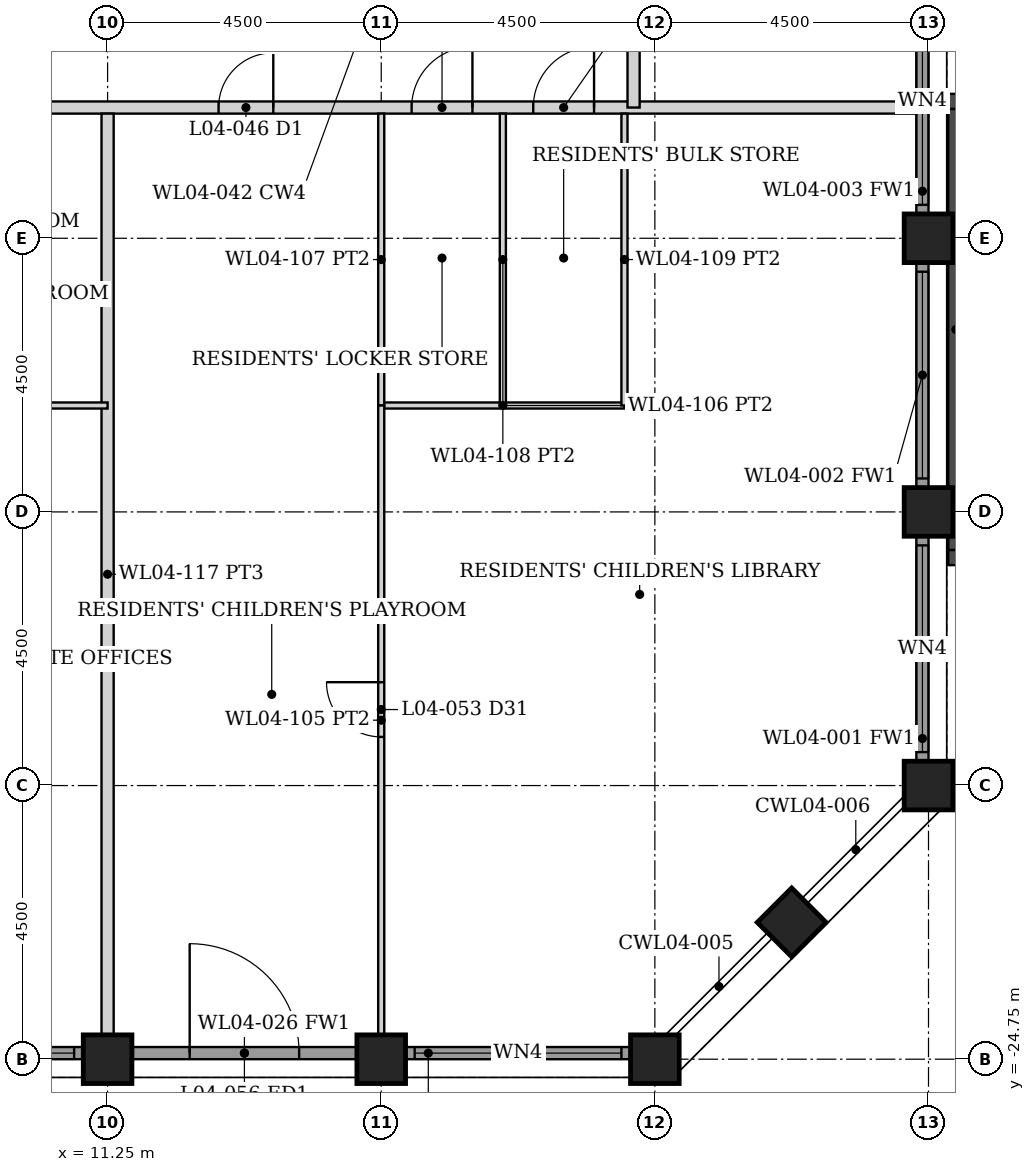
"""IFC4 building model, lengths in metres.
Left out: names, types, materials, properties, quantities, classifications, styles, units other than length and angle.
Written with IfcOpenShell. Run it as: python <this file> out.ifc"""

import sys

from ifc_helpers import new_model, si_unit, direction, frame, frame_2d, origin, origin_2d, place, context, subcontext, project, spatial, rectangle, hollow_rectangle, extrude, element, fill, save


model = new_model("IFC4")
c1 = context("Model", 3, precision=1e-05, world=origin(), true_north=direction((0.0, 1.0)))
c2 = subcontext(c1, "Body", "Model", "MODEL_VIEW")
j1 = project(units=[si_unit("LENGTHUNIT", "METRE"), si_unit("PLANEANGLEUNIT", "RADIAN")], contexts=[c1])
p1 = place(None, origin())
s1 = spatial("IfcSite", under=j1, at=p1, CompositionType="ELEMENT")
p2 = place(p1, origin())
s2 = spatial("IfcBuilding", under=s1, at=p2, CompositionType="ELEMENT")
p3 = place(p2, frame((0.0, 0.0, 21.5)))
s3 = spatial("IfcBuildingStorey", under=s2, at=p3, CompositionType="ELEMENT", Elevation=21.5)
for number, where, z_axis, x_axis in (
    (1, (24.75, -20.25, 0.0), (0.0, 0.0, 1.0), (1.0, 0.0, 0.0)),
    (2, (24.75, -15.75, 0.0), (0.0, 0.0, 1.0), (1.0, 0.0, 0.0)),
    (3, (24.75, -11.25, 0.0), (0.0, 0.0, 1.0), (1.0, 0.0, 0.0)),
    (4, (11.25, -24.75, 0.0), (0.0, 0.0, 1.0), (0.0, 1.0, 0.0)),
    (5, (15.75, -24.75, 0.0), (0.0, 0.0, 1.0), (0.0, 1.0, 0.0)),
    (6, (20.25, -24.75, 0.0), (0.0, 0.0, 1.0), (0.0, 1.0, 0.0)),
    (7, (22.5, -22.5, 0.0), (0.0, 0.0, 1.0), (0.707, -0.707, 0.0)),
):
    element("IfcColumn", number, at=place(p3, frame(where, z_axis=z_axis, x_axis=x_axis)), inside=s3, PredefinedType="COLUMN", context=c2, shape_type="SweptSolid", body=[
        extrude(hollow_rectangle(XDim=0.8, YDim=0.8, WallThickness=0.08, at=origin_2d()), origin(), (0.0, 0.0, 1.0), 5.0),
    ])
p4 = place(p3, frame((25.075, -16.5, 0.0), z_axis=(0.0, 0.0, 1.0), x_axis=(1.0, 0.0, 0.0)))
e8 = element("IfcWall", 8, at=p4, inside=s3, PredefinedType="SHEAR", context=c2, shape_type="SweptSolid", body=[
    extrude(rectangle(XDim=3.55, YDim=0.25, at=frame_2d((1.775, 0.0))), origin(), (0.0, 0.0, 1.0), 5.0),
])
p5 = place(p3, frame((25.075, -9.0, 0.0), z_axis=(0.0, 0.0, 1.0), x_axis=(1.0, 0.0, 0.0)))
e9 = element("IfcWall", 9, at=p5, inside=s3, PredefinedType="SHEAR", context=c2, shape_type="SweptSolid", body=[
    extrude(rectangle(XDim=3.55, YDim=0.25, at=frame_2d((1.775, 0.0))), origin(), (0.0, 0.0, 1.0), 5.0),
])
p6 = place(p5, frame((0.475, 0.0, 0.0)))
e10 = element("IfcOpeningElement", 10, at=p6, cuts=e9, PredefinedType="OPENING", context=c2, shape_type="SweptSolid", body=[
    extrude(rectangle(XDim=1.2, YDim=2.2, at=frame_2d((0.6, 1.1))), frame((0.0, 0.135, 0.0), z_axis=(0.0, -1.0, 0.0), x_axis=(1.0, 0.0, 0.0)), (0.0, 0.0, 1.0), 0.27),
])
p7 = place(p3, frame((25.2, -16.375, 0.0), z_axis=(0.0, 0.0, 1.0), x_axis=(0.0, 1.0, 0.0)))
e11 = element("IfcWall", 11, at=p7, inside=s3, PredefinedType="SHEAR", context=c2, shape_type="SweptSolid", body=[
    extrude(rectangle(XDim=7.25, YDim=0.25, at=frame_2d((3.625, 0.0))), origin(), (0.0, 0.0, 1.0), 5.0),
])
p8 = place(p3, frame((7.155, -24.65, 0.0), z_axis=(0.0, 0.0, 1.0), x_axis=(1.0, 0.0, 0.0)))
e12 = element("IfcWall", 12, at=p8, inside=s3, PredefinedType="SOLIDWALL", context=c2, shape_type="SweptSolid", body=[
    extrude(rectangle(XDim=3.69, YDim=0.2, at=frame_2d((1.845, 0.0))), origin(), (0.0, 0.0, 1.0), 3.879),
])
p9 = place(p8, frame((0.145, 0.0, 0.3)))
e13 = element("IfcOpeningElement", 13, at=p9, cuts=e12, PredefinedType="OPENING", context=c2, shape_type="SweptSolid", body=[
    extrude(rectangle(XDim=3.4, YDim=3.429, at=frame_2d((1.7, 1.714))), frame((0.0, 0.11, 0.0), z_axis=(0.0, -1.0, 0.0), x_axis=(1.0, 0.0, 0.0)), (0.0, 0.0, 1.0), 0.22),
])
p10 = place(p3, frame((11.655, -24.65, 0.0), z_axis=(0.0, 0.0, 1.0), x_axis=(1.0, 0.0, 0.0)))
e14 = element("IfcWall", 14, at=p10, inside=s3, PredefinedType="SOLIDWALL", context=c2, shape_type="SweptSolid", body=[
    extrude(rectangle(XDim=3.69, YDim=0.2, at=frame_2d((1.845, 0.0))), origin(), (0.0, 0.0, 1.0), 3.879),
])
p11 = place(p10, frame((0.945, 0.0, 0.0)))
e15 = element("IfcOpeningElement", 15, at=p11, cuts=e14, PredefinedType="OPENING", context=c2, shape_type="SweptSolid", body=[
    extrude(rectangle(XDim=1.8, YDim=2.4, at=frame_2d((0.9, 1.2))), frame((0.0, 0.11, 0.0), z_axis=(0.0, -1.0, 0.0), x_axis=(1.0, 0.0, 0.0)), (0.0, 0.0, 1.0), 0.22),
])
p12 = place(p3, frame((16.155, -24.65, 0.0), z_axis=(0.0, 0.0, 1.0), x_axis=(1.0, 0.0, 0.0)))
e16 = element("IfcWall", 16, at=p12, inside=s3, PredefinedType="SOLIDWALL", context=c2, shape_type="SweptSolid", body=[
    extrude(rectangle(XDim=3.69, YDim=0.2, at=frame_2d((1.845, 0.0))), origin(), (0.0, 0.0, 1.0), 3.879),
])
p13 = place(p12, frame((0.145, 0.0, 0.3)))
e17 = element("IfcOpeningElement", 17, at=p13, cuts=e16, PredefinedType="OPENING", context=c2, shape_type="SweptSolid", body=[
    extrude(rectangle(XDim=3.4, YDim=3.429, at=frame_2d((1.7, 1.714))), frame((0.0, 0.11, 0.0), z_axis=(0.0, -1.0, 0.0), x_axis=(1.0, 0.0, 0.0)), (0.0, 0.0, 1.0), 0.22),
])
p14 = place(p3, frame((24.65, -19.845, 0.0), z_axis=(0.0, 0.0, 1.0), x_axis=(0.0, 1.0, 0.0)))
e18 = element("IfcWall", 18, at=p14, inside=s3, PredefinedType="SOLIDWALL", context=c2, shape_type="SweptSolid", body=[
    extrude(rectangle(XDim=3.69, YDim=0.2, at=frame_2d((1.845, 0.0))), origin(), (0.0, 0.0, 1.0), 3.879),
])
p15 = place(p14, frame((0.145, 0.0, 0.3)))
e19 = element("IfcOpeningElement", 19, at=p15, cuts=e18, PredefinedType="OPENING", context=c2, shape_type="SweptSolid", body=[
    extrude(rectangle(XDim=3.4, YDim=3.429, at=frame_2d((1.7, 1.714))), frame((0.0, 0.11, 0.0), z_axis=(0.0, -1.0, 0.0), x_axis=(1.0, 0.0, 0.0)), (0.0, 0.0, 1.0), 0.22),
])
p16 = place(p3, frame((24.65, -15.345, 0.0), z_axis=(0.0, 0.0, 1.0), x_axis=(0.0, 1.0, 0.0)))
e20 = element("IfcWall", 20, at=p16, inside=s3, PredefinedType="SOLIDWALL", context=c2, shape_type="SweptSolid", body=[
    extrude(rectangle(XDim=3.69, YDim=0.2, at=frame_2d((1.845, 0.0))), origin(), (0.0, 0.0, 1.0), 3.879),
])
p17 = place(p16, frame((0.145, 0.0, 0.3)))
e21 = element("IfcOpeningElement", 21, at=p17, cuts=e20, PredefinedType="OPENING", context=c2, shape_type="SweptSolid", body=[
    extrude(rectangle(XDim=3.4, YDim=3.429, at=frame_2d((1.7, 1.714))), frame((0.0, 0.11, 0.0), z_axis=(0.0, -1.0, 0.0), x_axis=(1.0, 0.0, 0.0)), (0.0, 0.0, 1.0), 0.22),
])
p18 = place(p3, frame((24.65, -10.845, 0.0), z_axis=(0.0, 0.0, 1.0), x_axis=(0.0, 1.0, 0.0)))
e22 = element("IfcWall", 22, at=p18, inside=s3, PredefinedType="SOLIDWALL", context=c2, shape_type="SweptSolid", body=[
    extrude(rectangle(XDim=3.69, YDim=0.2, at=frame_2d((1.845, 0.0))), origin(), (0.0, 0.0, 1.0), 3.879),
])
p19 = place(p18, frame((0.145, 0.0, 0.3)))
e23 = element("IfcOpeningElement", 23, at=p19, cuts=e22, PredefinedType="OPENING", context=c2, shape_type="SweptSolid", body=[
    extrude(rectangle(XDim=3.4, YDim=3.429, at=frame_2d((1.7, 1.714))), frame((0.0, 0.11, 0.0), z_axis=(0.0, -1.0, 0.0), x_axis=(1.0, 0.0, 0.0)), (0.0, 0.0, 1.0), 0.22),
])
p20 = place(p3, frame((-24.55, -9.1, 0.0), z_axis=(0.0, 0.0, 1.0), x_axis=(1.0, 0.0, 0.0)))
e24 = element("IfcWall", 24, at=p20, inside=s3, PredefinedType="PARTITIONING", context=c2, shape_type="SweptSolid", body=[
    extrude(rectangle(XDim=49.1, YDim=0.2, at=frame_2d((24.55, 0.0))), origin(), (0.0, 0.0, 1.0), 3.873),
])
p21 = place(p20, frame((6.452, 0.0, 0.0)))
e25 = element("IfcOpeningElement", 25, at=p21, cuts=e24, PredefinedType="OPENING", context=c2, shape_type="SweptSolid", body=[
    extrude(rectangle(XDim=0.9, YDim=2.1, at=frame_2d((0.45, 1.05))), frame((0.0, 0.11, 0.0), z_axis=(0.0, -1.0, 0.0), x_axis=(1.0, 0.0, 0.0)), (0.0, 0.0, 1.0), 0.22),
])
p22 = place(p20, frame((12.85, 0.0, 0.0)))
e26 = element("IfcOpeningElement", 26, at=p22, cuts=e24, PredefinedType="OPENING", context=c2, shape_type="SweptSolid", body=[
    extrude(rectangle(XDim=0.9, YDim=2.1, at=frame_2d((0.45, 1.05))), frame((0.0, 0.11, 0.0), z_axis=(0.0, -1.0, 0.0), x_axis=(1.0, 0.0, 0.0)), (0.0, 0.0, 1.0), 0.22),
])
p23 = place(p20, frame((20.934, 0.0, 0.0)))
e27 = element("IfcOpeningElement", 27, at=p23, cuts=e24, PredefinedType="OPENING", context=c2, shape_type="SweptSolid", body=[
    extrude(rectangle(XDim=0.9, YDim=2.1, at=frame_2d((0.45, 1.05))), frame((0.0, 0.11, 0.0), z_axis=(0.0, -1.0, 0.0), x_axis=(1.0, 0.0, 0.0)), (0.0, 0.0, 1.0), 0.22),
])
p24 = place(p20, frame((18.425, 0.0, 0.0)))
e28 = element("IfcOpeningElement", 28, at=p24, cuts=e24, PredefinedType="OPENING", context=c2, shape_type="SweptSolid", body=[
    extrude(rectangle(XDim=1.5, YDim=2.1, at=frame_2d((0.75, 1.05))), frame((0.0, 0.11, 0.0), z_axis=(0.0, -1.0, 0.0), x_axis=(1.0, 0.0, 0.0)), (0.0, 0.0, 1.0), 0.22),
])
p25 = place(p20, frame((30.18, 0.0, 0.0)))
e29 = element("IfcOpeningElement", 29, at=p25, cuts=e24, PredefinedType="OPENING", context=c2, shape_type="SweptSolid", body=[
    extrude(rectangle(XDim=0.9, YDim=2.1, at=frame_2d((0.45, 1.05))), frame((0.0, 0.11, 0.0), z_axis=(0.0, -1.0, 0.0), x_axis=(1.0, 0.0, 0.0)), (0.0, 0.0, 1.0), 0.22),
])
p26 = place(p20, frame((23.3, 0.0, 0.0)))
e30 = element("IfcOpeningElement", 30, at=p26, cuts=e24, PredefinedType="OPENING", context=c2, shape_type="SweptSolid", body=[
    extrude(rectangle(XDim=1.0, YDim=2.1, at=frame_2d((0.5, 1.05))), frame((0.0, 0.11, 0.0), z_axis=(0.0, -1.0, 0.0), x_axis=(1.0, 0.0, 0.0)), (0.0, 0.0, 1.0), 0.22),
])
p27 = place(p20, frame((26.15, 0.0, 0.0)))
e31 = element("IfcOpeningElement", 31, at=p27, cuts=e24, PredefinedType="OPENING", context=c2, shape_type="SweptSolid", body=[
    extrude(rectangle(XDim=0.8, YDim=2.1, at=frame_2d((0.4, 1.05))), frame((0.0, 0.11, 0.0), z_axis=(0.0, -1.0, 0.0), x_axis=(1.0, 0.0, 0.0)), (0.0, 0.0, 1.0), 0.22),
])
p28 = place(p20, frame((28.4, 0.0, 0.0)))
e32 = element("IfcOpeningElement", 32, at=p28, cuts=e24, PredefinedType="OPENING", context=c2, shape_type="SweptSolid", body=[
    extrude(rectangle(XDim=1.0, YDim=2.1, at=frame_2d((0.5, 1.05))), frame((0.0, 0.11, 0.0), z_axis=(0.0, -1.0, 0.0), x_axis=(1.0, 0.0, 0.0)), (0.0, 0.0, 1.0), 0.22),
])
p29 = place(p20, frame((33.05, 0.0, 0.0)))
e33 = element("IfcOpeningElement", 33, at=p29, cuts=e24, PredefinedType="OPENING", context=c2, shape_type="SweptSolid", body=[
    extrude(rectangle(XDim=1.0, YDim=2.1, at=frame_2d((0.5, 1.05))), frame((0.0, 0.11, 0.0), z_axis=(0.0, -1.0, 0.0), x_axis=(1.0, 0.0, 0.0)), (0.0, 0.0, 1.0), 0.22),
])
p30 = place(p20, frame((37.625, 0.0, 0.0)))
e34 = element("IfcOpeningElement", 34, at=p30, cuts=e24, PredefinedType="OPENING", context=c2, shape_type="SweptSolid", body=[
    extrude(rectangle(XDim=0.9, YDim=2.1, at=frame_2d((0.45, 1.05))), frame((0.0, 0.11, 0.0), z_axis=(0.0, -1.0, 0.0), x_axis=(1.0, 0.0, 0.0)), (0.0, 0.0, 1.0), 0.22),
])
p31 = place(p20, frame((40.8, 0.0, 0.0)))
e35 = element("IfcOpeningElement", 35, at=p31, cuts=e24, PredefinedType="OPENING", context=c2, shape_type="SweptSolid", body=[
    extrude(rectangle(XDim=1.0, YDim=2.1, at=frame_2d((0.5, 1.05))), frame((0.0, 0.11, 0.0), z_axis=(0.0, -1.0, 0.0), x_axis=(1.0, 0.0, 0.0)), (0.0, 0.0, 1.0), 0.22),
])
p32 = place(p20, frame((42.8, 0.0, 0.0)))
e36 = element("IfcOpeningElement", 36, at=p32, cuts=e24, PredefinedType="OPENING", context=c2, shape_type="SweptSolid", body=[
    extrude(rectangle(XDim=1.0, YDim=2.1, at=frame_2d((0.5, 1.05))), frame((0.0, 0.11, 0.0), z_axis=(0.0, -1.0, 0.0), x_axis=(1.0, 0.0, 0.0)), (0.0, 0.0, 1.0), 0.22),
])
p33 = place(p3, frame((19.9, -9.1, 0.0), z_axis=(0.0, 0.0, 1.0), x_axis=(0.0, 1.0, 0.0)))
e37 = element("IfcWall", 37, at=p33, inside=s3, PredefinedType="PARTITIONING", context=c2, shape_type="SweptSolid", body=[
    extrude(rectangle(XDim=18.2, YDim=0.2, at=frame_2d((9.1, 0.0))), origin(), (0.0, 0.0, 1.0), 3.873),
])
p34 = place(p33, frame((2.975, 0.0, 0.0)))
e38 = element("IfcOpeningElement", 38, at=p34, cuts=e37, PredefinedType="OPENING", context=c2, shape_type="SweptSolid", body=[
    extrude(rectangle(XDim=1.0, YDim=2.1, at=frame_2d((0.5, 1.05))), frame((0.0, 0.11, 0.0), z_axis=(0.0, -1.0, 0.0), x_axis=(1.0, 0.0, 0.0)), (0.0, 0.0, 1.0), 0.22),
])
p35 = place(p33, frame((8.6, 0.0, 0.0)))
e39 = element("IfcOpeningElement", 39, at=p35, cuts=e37, PredefinedType="OPENING", context=c2, shape_type="SweptSolid", body=[
    extrude(rectangle(XDim=1.0, YDim=2.1, at=frame_2d((0.5, 1.05))), frame((0.0, 0.11, 0.0), z_axis=(0.0, -1.0, 0.0), x_axis=(1.0, 0.0, 0.0)), (0.0, 0.0, 1.0), 0.22),
])
p36 = place(p33, frame((13.1, 0.0, 0.0)))
e40 = element("IfcOpeningElement", 40, at=p36, cuts=e37, PredefinedType="OPENING", context=c2, shape_type="SweptSolid", body=[
    extrude(rectangle(XDim=1.0, YDim=2.1, at=frame_2d((0.5, 1.05))), frame((0.0, 0.11, 0.0), z_axis=(0.0, -1.0, 0.0), x_axis=(1.0, 0.0, 0.0)), (0.0, 0.0, 1.0), 0.22),
])
p37 = place(p33, frame((16.575, 0.0, 0.0)))
e41 = element("IfcOpeningElement", 41, at=p37, cuts=e37, PredefinedType="OPENING", context=c2, shape_type="SweptSolid", body=[
    extrude(rectangle(XDim=0.8, YDim=2.1, at=frame_2d((0.4, 1.05))), frame((0.0, 0.11, 0.0), z_axis=(0.0, -1.0, 0.0), x_axis=(1.0, 0.0, 0.0)), (0.0, 0.0, 1.0), 0.22),
])
p38 = place(p3, frame((11.25, -24.35, 0.0), z_axis=(0.0, 0.0, 1.0), x_axis=(0.0, 1.0, 0.0)))
e42 = element("IfcWall", 42, at=p38, inside=s3, PredefinedType="PARTITIONING", context=c2, shape_type="SweptSolid", body=[
    extrude(rectangle(XDim=15.15, YDim=0.2, at=frame_2d((7.575, 0.0))), origin(), (0.0, 0.0, 1.0), 3.873),
])
p39 = place(p3, frame((6.75, -14.0, 0.0), z_axis=(0.0, 0.0, 1.0), x_axis=(1.0, 0.0, 0.0)))
e43 = element("IfcWall", 43, at=p39, inside=s3, PredefinedType="PARTITIONING", context=c2, shape_type="SweptSolid", body=[
    extrude(rectangle(XDim=4.5, YDim=0.1, at=frame_2d((2.25, 0.0))), origin(), (0.0, 0.0, 1.0), 3.873),
])
p40 = place(p3, frame((15.75, -14.0, 0.0), z_axis=(0.0, 0.0, 1.0), x_axis=(1.0, 0.0, 0.0)))
e44 = element("IfcWall", 44, at=p40, inside=s3, PredefinedType="PARTITIONING", context=c2, shape_type="SweptSolid", body=[
    extrude(rectangle(XDim=4.0, YDim=0.1, at=frame_2d((2.0, 0.0))), origin(), (0.0, 0.0, 1.0), 3.873),
])
for number, where, z_axis, x_axis in (
    (45, (15.75, -14.0, 0.0), (0.0, 0.0, 1.0), (0.0, 1.0, 0.0)),
    (46, (17.75, -14.0, 0.0), (0.0, 0.0, 1.0), (0.0, 1.0, 0.0)),
    (47, (19.75, -14.0, 0.0), (0.0, 0.0, 1.0), (0.0, 1.0, 0.0)),
):
    element("IfcWall", number, at=place(p3, frame(where, z_axis=z_axis, x_axis=x_axis)), inside=s3, PredefinedType="PARTITIONING", context=c2, shape_type="SweptSolid", body=[
        extrude(rectangle(XDim=4.8, YDim=0.1, at=frame_2d((2.4, 0.0))), origin(), (0.0, 0.0, 1.0), 3.873),
    ])
p41 = place(p3, frame((15.75, -24.35, 0.0), z_axis=(0.0, 0.0, 1.0), x_axis=(0.0, 1.0, 0.0)))
e48 = element("IfcWall", 48, at=p41, inside=s3, PredefinedType="PARTITIONING", context=c2, shape_type="SweptSolid", body=[
    extrude(rectangle(XDim=10.35, YDim=0.1, at=frame_2d((5.175, 0.0))), origin(), (0.0, 0.0, 1.0), 3.873),
])
p42 = place(p41, frame((4.9, 0.0, 0.0)))
e49 = element("IfcOpeningElement", 49, at=p42, cuts=e48, PredefinedType="OPENING", context=c2, shape_type="SweptSolid", body=[
    extrude(rectangle(XDim=0.9, YDim=2.1, at=frame_2d((0.45, 1.05))), frame((0.0, 0.06, 0.0), z_axis=(0.0, -1.0, 0.0), x_axis=(1.0, 0.0, 0.0)), (0.0, 0.0, 1.0), 0.12),
])
p43 = place(p9, origin())
e50 = element("IfcWindow", 50, at=p43, inside=s3, PartitioningType="SINGLE_PANEL", PredefinedType="WINDOW", context=c2, shape_type="SweptSolid", body=[
    extrude(rectangle(XDim=3.4, YDim=3.429, at=frame_2d((1.7, 1.714))), frame((0.0, 0.03, 0.0), z_axis=(0.0, -1.0, 0.0), x_axis=(1.0, 0.0, 0.0)), (0.0, 0.0, 1.0), 0.06),
])
fill(e13, e50)
p44 = place(p11, origin())
e51 = element("IfcDoor", 51, at=p44, inside=s3, OperationType="DOUBLE_DOOR_SINGLE_SWING", PredefinedType="DOOR", context=c2, shape_type="SweptSolid", body=[
    extrude(rectangle(XDim=1.8, YDim=2.4, at=frame_2d((0.9, 1.2))), frame((0.0, 0.025, 0.0), z_axis=(0.0, -1.0, 0.0), x_axis=(1.0, 0.0, 0.0)), (0.0, 0.0, 1.0), 0.05),
])
fill(e15, e51)
p45 = place(p13, origin())
e52 = element("IfcWindow", 52, at=p45, inside=s3, PartitioningType="SINGLE_PANEL", PredefinedType="WINDOW", context=c2, shape_type="SweptSolid", body=[
    extrude(rectangle(XDim=3.4, YDim=3.429, at=frame_2d((1.7, 1.714))), frame((0.0, 0.03, 0.0), z_axis=(0.0, -1.0, 0.0), x_axis=(1.0, 0.0, 0.0)), (0.0, 0.0, 1.0), 0.06),
])
fill(e17, e52)
p46 = place(p15, origin())
e53 = element("IfcWindow", 53, at=p46, inside=s3, PartitioningType="SINGLE_PANEL", PredefinedType="WINDOW", context=c2, shape_type="SweptSolid", body=[
    extrude(rectangle(XDim=3.4, YDim=3.429, at=frame_2d((1.7, 1.714))), frame((0.0, 0.03, 0.0), z_axis=(0.0, -1.0, 0.0), x_axis=(1.0, 0.0, 0.0)), (0.0, 0.0, 1.0), 0.06),
])
fill(e19, e53)
p47 = place(p17, origin())
e54 = element("IfcWindow", 54, at=p47, inside=s3, PartitioningType="SINGLE_PANEL", PredefinedType="WINDOW", context=c2, shape_type="SweptSolid", body=[
    extrude(rectangle(XDim=3.4, YDim=3.429, at=frame_2d((1.7, 1.714))), frame((0.0, 0.03, 0.0), z_axis=(0.0, -1.0, 0.0), x_axis=(1.0, 0.0, 0.0)), (0.0, 0.0, 1.0), 0.06),
])
fill(e21, e54)
p48 = place(p19, origin())
e55 = element("IfcWindow", 55, at=p48, inside=s3, PartitioningType="SINGLE_PANEL", PredefinedType="WINDOW", context=c2, shape_type="SweptSolid", body=[
    extrude(rectangle(XDim=3.4, YDim=3.429, at=frame_2d((1.7, 1.714))), frame((0.0, 0.03, 0.0), z_axis=(0.0, -1.0, 0.0), x_axis=(1.0, 0.0, 0.0)), (0.0, 0.0, 1.0), 0.06),
])
fill(e23, e55)
p49 = place(p30, origin())
e56 = element("IfcDoor", 56, at=p49, inside=s3, OperationType="SINGLE_SWING_RIGHT", PredefinedType="DOOR", context=c2, shape_type="SweptSolid", body=[
    extrude(rectangle(XDim=0.9, YDim=2.1, at=frame_2d((0.45, 1.05))), frame((0.0, 0.025, 0.0), z_axis=(0.0, -1.0, 0.0), x_axis=(1.0, 0.0, 0.0)), (0.0, 0.0, 1.0), 0.05),
])
fill(e34, e56)
p50 = place(p31, origin())
e57 = element("IfcDoor", 57, at=p50, inside=s3, OperationType="SINGLE_SWING_RIGHT", PredefinedType="DOOR", context=c2, shape_type="SweptSolid", body=[
    extrude(rectangle(XDim=1.0, YDim=2.1, at=frame_2d((0.5, 1.05))), frame((0.0, 0.025, 0.0), z_axis=(0.0, -1.0, 0.0), x_axis=(1.0, 0.0, 0.0)), (0.0, 0.0, 1.0), 0.05),
])
fill(e35, e57)
p51 = place(p32, origin())
e58 = element("IfcDoor", 58, at=p51, inside=s3, OperationType="SINGLE_SWING_RIGHT", PredefinedType="DOOR", context=c2, shape_type="SweptSolid", body=[
    extrude(rectangle(XDim=1.0, YDim=2.1, at=frame_2d((0.5, 1.05))), frame((0.0, 0.025, 0.0), z_axis=(0.0, -1.0, 0.0), x_axis=(1.0, 0.0, 0.0)), (0.0, 0.0, 1.0), 0.05),
])
fill(e36, e58)
p52 = place(p42, origin())
e59 = element("IfcDoor", 59, at=p52, inside=s3, OperationType="SINGLE_SWING_RIGHT", PredefinedType="DOOR", context=c2, shape_type="SweptSolid", body=[
    extrude(rectangle(XDim=0.9, YDim=2.1, at=frame_2d((0.45, 1.05))), frame((0.0, 0.025, 0.0), z_axis=(0.0, -1.0, 0.0), x_axis=(1.0, 0.0, 0.0)), (0.0, 0.0, 1.0), 0.05),
])
fill(e49, e59)
save(model, sys.argv[1])
